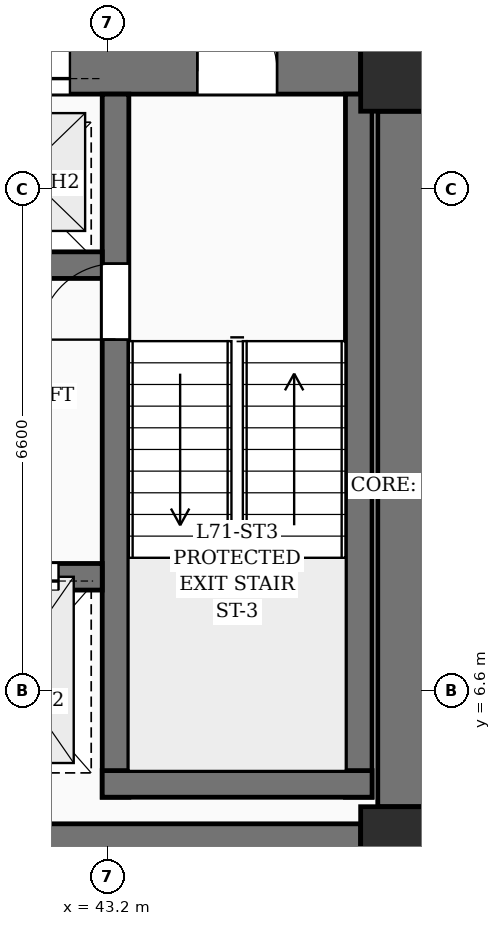
"""IFC4 building model, lengths in metres.
Left out: names, types, materials, properties, quantities, classifications, styles, units other than length and angle.
Written with IfcOpenShell. Run it as: python <this file> out.ifc"""

import sys

from ifc_helpers import new_model, si_unit, direction, frame, frame_2d, origin, origin_2d, place, context, subcontext, project, spatial, rectangle, extrude, element, fill, save


model = new_model("IFC4")
c1 = context("Model", 3, precision=1e-05, world=origin(), true_north=direction((0.0, 1.0)))
c2 = subcontext(c1, "Body", "Model", "MODEL_VIEW")
j1 = project(units=[si_unit("LENGTHUNIT", "METRE"), si_unit("PLANEANGLEUNIT", "RADIAN")], contexts=[c1])
p1 = place(None, origin())
s1 = spatial("IfcSite", under=j1, at=p1, CompositionType="ELEMENT")
p2 = place(p1, origin())
s2 = spatial("IfcBuilding", under=s1, at=p2, CompositionType="ELEMENT")
p3 = place(p2, frame((0.0, 0.0, 274.5)))
s3 = spatial("IfcBuildingStorey", under=s2, at=p3, CompositionType="ELEMENT", Elevation=274.5)
for number, where, z_axis, x_axis in (
    (1, (47.05, 4.55, 0.0), (0.0, 0.0, 1.0), (1.0, 0.0, 0.0)),
    (2, (47.05, 14.75, 0.0), (0.0, 0.0, 1.0), (1.0, 0.0, 0.0)),
):
    element("IfcColumn", number, at=place(p3, frame(where, z_axis=z_axis, x_axis=x_axis)), inside=s3, PredefinedType="COLUMN", context=c2, shape_type="SweptSolid", body=[
        extrude(rectangle(XDim=1.05, YDim=1.05, at=origin_2d()), origin(), (0.0, 0.0, 1.0), 3.75),
    ])
p4 = place(p3, frame((35.675, 4.55, 0.0), z_axis=(0.0, 0.0, 1.0), x_axis=(1.0, 0.0, 0.0)))
e3 = element("IfcWall", 3, at=p4, inside=s3, PredefinedType="SHEAR", context=c2, shape_type="SweptSolid", body=[
    extrude(rectangle(XDim=10.85, YDim=0.6, at=frame_2d((5.425, 0.0))), origin(), (0.0, 0.0, 1.0), 3.75),
])
p5 = place(p3, frame((35.675, 14.75, 0.0), z_axis=(0.0, 0.0, 1.0), x_axis=(1.0, 0.0, 0.0)))
e4 = element("IfcWall", 4, at=p5, inside=s3, PredefinedType="SHEAR", context=c2, shape_type="SweptSolid", body=[
    extrude(rectangle(XDim=10.85, YDim=0.6, at=frame_2d((5.425, 0.0))), origin(), (0.0, 0.0, 1.0), 3.75),
])
p6 = place(p5, frame((1.1, 0.0, 0.0)))
e5 = element("IfcOpeningElement", 5, at=p6, cuts=e4, PredefinedType="OPENING", context=c2, shape_type="SweptSolid", body=[
    extrude(rectangle(XDim=1.05, YDim=2.15, at=frame_2d((0.525, 1.075))), frame((0.0, 0.31, 0.0), z_axis=(0.0, -1.0, 0.0), x_axis=(1.0, 0.0, 0.0)), (0.0, 0.0, 1.0), 0.62),
])
p7 = place(p5, frame((8.7, 0.0, 0.0)))
e6 = element("IfcOpeningElement", 6, at=p7, cuts=e4, PredefinedType="OPENING", context=c2, shape_type="SweptSolid", body=[
    extrude(rectangle(XDim=1.05, YDim=2.15, at=frame_2d((0.525, 1.075))), frame((0.0, 0.31, 0.0), z_axis=(0.0, -1.0, 0.0), x_axis=(1.0, 0.0, 0.0)), (0.0, 0.0, 1.0), 0.62),
])
p8 = place(p5, frame((3.825, 0.0, 0.0)))
e7 = element("IfcOpeningElement", 7, at=p8, cuts=e4, PredefinedType="OPENING", context=c2, shape_type="SweptSolid", body=[
    extrude(rectangle(XDim=1.2, YDim=2.2, at=frame_2d((0.6, 1.1))), frame((0.0, 0.31, 0.0), z_axis=(0.0, -1.0, 0.0), x_axis=(1.0, 0.0, 0.0)), (0.0, 0.0, 1.0), 0.62),
])
p9 = place(p5, frame((5.825, 0.0, 0.0)))
e8 = element("IfcOpeningElement", 8, at=p9, cuts=e4, PredefinedType="OPENING", context=c2, shape_type="SweptSolid", body=[
    extrude(rectangle(XDim=1.2, YDim=2.2, at=frame_2d((0.6, 1.1))), frame((0.0, 0.31, 0.0), z_axis=(0.0, -1.0, 0.0), x_axis=(1.0, 0.0, 0.0)), (0.0, 0.0, 1.0), 0.62),
])
p10 = place(p3, frame((47.05, 5.075, 0.0), z_axis=(0.0, 0.0, 1.0), x_axis=(0.0, 1.0, 0.0)))
e9 = element("IfcWall", 9, at=p10, inside=s3, PredefinedType="SHEAR", context=c2, shape_type="SweptSolid", body=[
    extrude(rectangle(XDim=9.15, YDim=0.6, at=frame_2d((4.575, 0.0))), origin(), (0.0, 0.0, 1.0), 3.75),
])
p11 = place(p3, frame((43.3, 5.2, 0.0), z_axis=(0.0, 0.0, 1.0), x_axis=(0.0, 1.0, 0.0)))
e10 = element("IfcWall", 10, at=p11, inside=s3, PredefinedType="SOLIDWALL", context=c2, shape_type="SweptSolid", body=[
    extrude(rectangle(XDim=9.25, YDim=0.35, at=frame_2d((4.625, 0.0))), origin(), (0.0, 0.0, 1.0), 3.75),
])
p12 = place(p11, frame((6.02, 0.0, 0.0)))
e11 = element("IfcOpeningElement", 11, at=p12, cuts=e10, PredefinedType="OPENING", context=c2, shape_type="SweptSolid", body=[
    extrude(rectangle(XDim=1.0, YDim=2.15, at=frame_2d((0.5, 1.075))), frame((0.0, 0.185, 0.0), z_axis=(0.0, -1.0, 0.0), x_axis=(1.0, 0.0, 0.0)), (0.0, 0.0, 1.0), 0.37),
])
p13 = place(p3, frame((46.5, 5.2, 0.0), z_axis=(0.0, 0.0, 1.0), x_axis=(0.0, 1.0, 0.0)))
e12 = element("IfcWall", 12, at=p13, inside=s3, PredefinedType="SOLIDWALL", context=c2, shape_type="SweptSolid", body=[
    extrude(rectangle(XDim=9.25, YDim=0.35, at=frame_2d((4.625, 0.0))), origin(), (0.0, 0.0, 1.0), 3.75),
])
p14 = place(p3, frame((43.125, 5.375, 0.0), z_axis=(0.0, 0.0, 1.0), x_axis=(1.0, 0.0, 0.0)))
e13 = element("IfcWall", 13, at=p14, inside=s3, PredefinedType="SOLIDWALL", context=c2, shape_type="SweptSolid", body=[
    extrude(rectangle(XDim=3.55, YDim=0.35, at=frame_2d((1.775, 0.0))), origin(), (0.0, 0.0, 1.0), 3.75),
])
p15 = place(p3, frame((40.55, 8.1, 0.0), z_axis=(0.0, 0.0, 1.0), x_axis=(1.0, 0.0, 0.0)))
e14 = element("IfcWall", 14, at=p15, inside=s3, PredefinedType="SOLIDWALL", context=c2, shape_type="SweptSolid", body=[
    extrude(rectangle(XDim=2.575, YDim=0.35, at=frame_2d((1.288, 0.0))), origin(), (0.0, 0.0, 1.0), 3.75),
])
p16 = place(p15, frame((0.7, 0.0, 0.0)))
e15 = element("IfcOpeningElement", 15, at=p16, cuts=e14, PredefinedType="OPENING", context=c2, shape_type="SweptSolid", body=[
    extrude(rectangle(XDim=1.3, YDim=2.25, at=frame_2d((0.65, 1.125))), frame((0.0, 0.185, 0.0), z_axis=(0.0, -1.0, 0.0), x_axis=(1.0, 0.0, 0.0)), (0.0, 0.0, 1.0), 0.37),
])
p17 = place(p3, frame((39.075, 12.2, 0.0), z_axis=(0.0, 0.0, 1.0), x_axis=(1.0, 0.0, 0.0)))
e16 = element("IfcWall", 16, at=p17, inside=s3, PredefinedType="SOLIDWALL", context=c2, shape_type="SweptSolid", body=[
    extrude(rectangle(XDim=4.05, YDim=0.35, at=frame_2d((2.025, 0.0))), origin(), (0.0, 0.0, 1.0), 3.75),
])
p18 = place(p7, origin())
e17 = element("IfcDoor", 17, at=p18, inside=s3, OperationType="SINGLE_SWING_LEFT", PredefinedType="DOOR", context=c2, shape_type="SweptSolid", body=[
    extrude(rectangle(XDim=1.05, YDim=2.15, at=frame_2d((0.525, 1.075))), frame((0.0, 0.025, 0.0), z_axis=(0.0, -1.0, 0.0), x_axis=(1.0, 0.0, 0.0)), (0.0, 0.0, 1.0), 0.05),
])
fill(e6, e17)
p19 = place(p12, origin())
e18 = element("IfcDoor", 18, at=p19, inside=s3, OperationType="SINGLE_SWING_LEFT", PredefinedType="DOOR", context=c2, shape_type="SweptSolid", body=[
    extrude(rectangle(XDim=1.0, YDim=2.15, at=frame_2d((0.5, 1.075))), frame((0.0, 0.025, 0.0), z_axis=(0.0, -1.0, 0.0), x_axis=(1.0, 0.0, 0.0)), (0.0, 0.0, 1.0), 0.05),
])
fill(e11, e18)
p20 = place(p16, origin())
e19 = element("IfcDoor", 19, at=p20, inside=s3, OperationType="DOUBLE_DOOR_SLIDING", PredefinedType="DOOR", context=c2, shape_type="SweptSolid", body=[
    extrude(rectangle(XDim=1.3, YDim=2.25, at=frame_2d((0.65, 1.125))), frame((0.0, 0.025, 0.0), z_axis=(0.0, -1.0, 0.0), x_axis=(1.0, 0.0, 0.0)), (0.0, 0.0, 1.0), 0.05),
])
fill(e15, e19)
p21 = place(p9, origin())
e20 = element("IfcDoor", 20, at=p21, inside=s3, OperationType="DOUBLE_DOOR_SLIDING", PredefinedType="DOOR", context=c2, shape_type="SweptSolid", body=[
    extrude(rectangle(XDim=1.2, YDim=2.2, at=frame_2d((0.6, 1.1))), frame((0.0, 0.025, 0.0), z_axis=(0.0, -1.0, 0.0), x_axis=(1.0, 0.0, 0.0)), (0.0, 0.0, 1.0), 0.05),
])
fill(e8, e20)
save(model, sys.argv[1])
